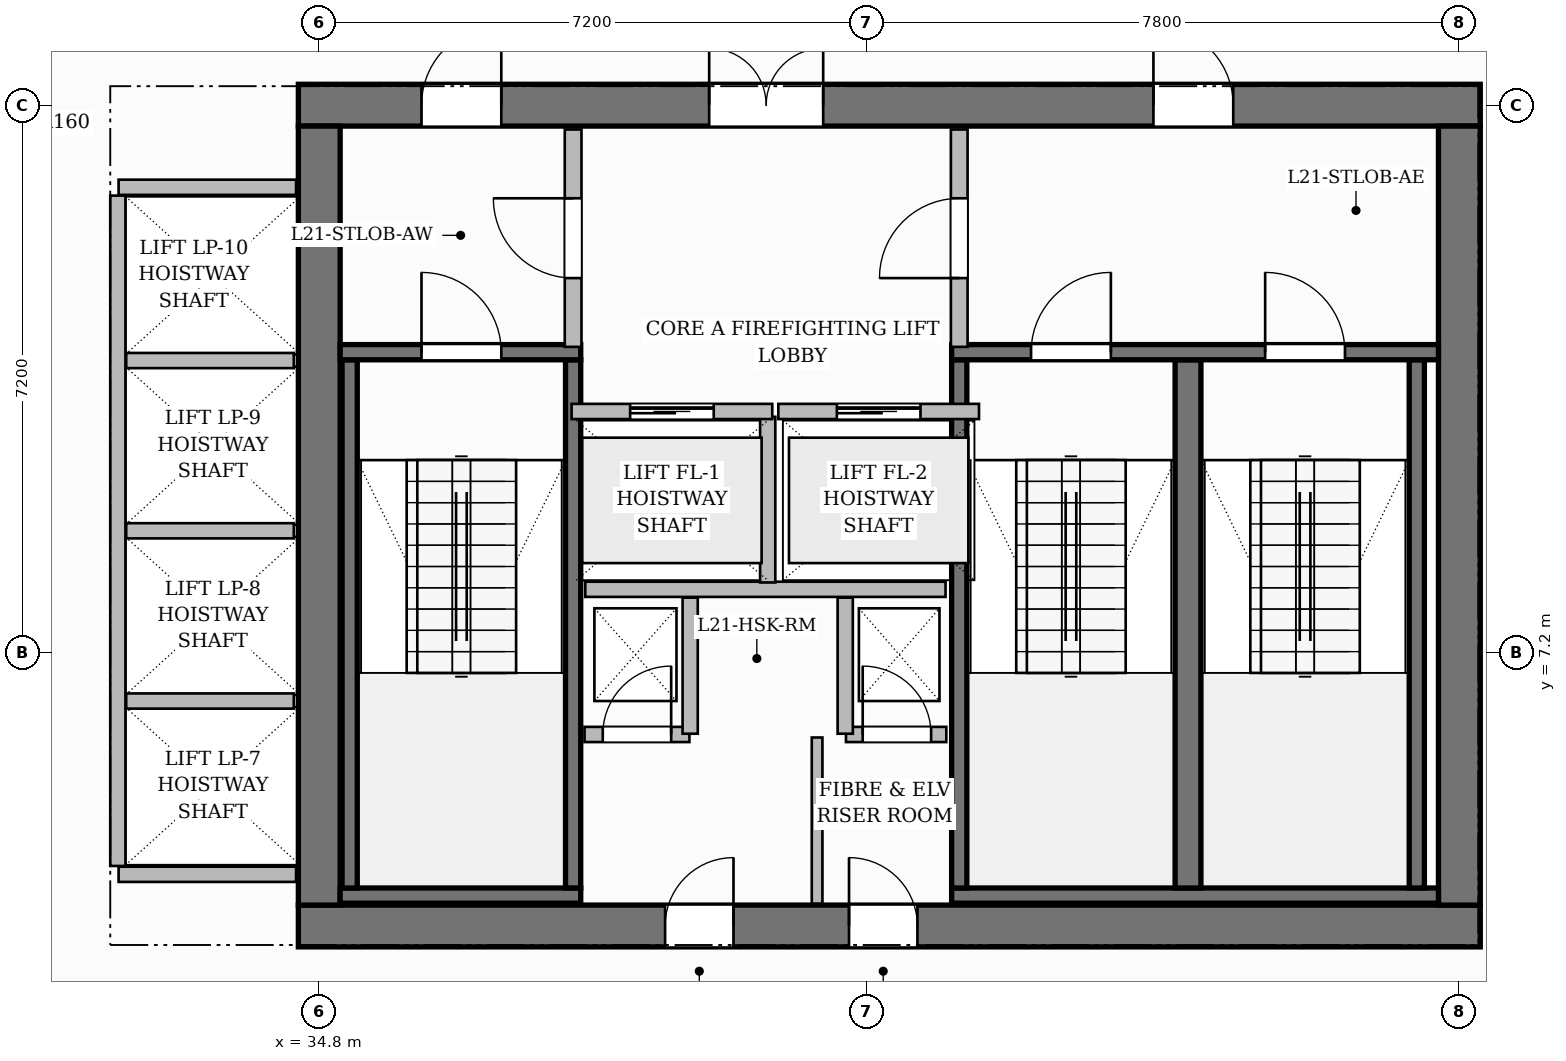
"""IFC4 building model, lengths in metres.
Left out: names, types, materials, properties, quantities, classifications, styles, units other than length and angle.
Written with IfcOpenShell. Run it as: python <this file> out.ifc"""

import sys

from ifc_helpers import new_model, si_unit, direction, frame, frame_2d, origin, place, context, subcontext, project, spatial, rectangle, extrude, source, transform, mapped, element, fill, save


model = new_model("IFC4")
c1 = context("Model", 3, precision=1e-05, world=origin(), true_north=direction((0.0, 1.0)))
c2 = subcontext(c1, "Body", "Model", "MODEL_VIEW")
j1 = project(units=[si_unit("LENGTHUNIT", "METRE"), si_unit("PLANEANGLEUNIT", "RADIAN")], contexts=[c1])
p1 = place(None, origin())
s1 = spatial("IfcSite", under=j1, at=p1, CompositionType="ELEMENT")
p2 = place(p1, origin())
s2 = spatial("IfcBuilding", under=s1, at=p2, CompositionType="ELEMENT")
p3 = place(p2, frame((0.0, 0.0, 87.9)))
s3 = spatial("IfcBuildingStorey", under=s2, at=p3, CompositionType="ELEMENT", Elevation=87.9)
p4 = place(p3, frame((34.525, 3.6, 0.0), z_axis=(0.0, 0.0, 1.0), x_axis=(1.0, 0.0, 0.0)))
e1 = element("IfcWall", 1, at=p4, inside=s3, PredefinedType="SHEAR", context=c2, shape_type="SweptSolid", body=[
    extrude(rectangle(XDim=15.55, YDim=0.55, at=frame_2d((7.775, 0.0))), origin(), (0.0, 0.0, 1.0), 3.7),
])
p5 = place(p4, frame((4.825, 0.0, 0.0)))
e2 = element("IfcOpeningElement", 2, at=p5, cuts=e1, PredefinedType="OPENING", context=c2, shape_type="SweptSolid", body=[
    extrude(rectangle(XDim=0.9, YDim=2.1, at=frame_2d((0.45, 1.05))), frame((0.0, 0.285, 0.0), z_axis=(0.0, -1.0, 0.0), x_axis=(1.0, 0.0, 0.0)), (0.0, 0.0, 1.0), 0.57),
])
p6 = place(p4, frame((7.245, 0.0, 0.0)))
e3 = element("IfcOpeningElement", 3, at=p6, cuts=e1, PredefinedType="OPENING", context=c2, shape_type="SweptSolid", body=[
    extrude(rectangle(XDim=0.9, YDim=2.1, at=frame_2d((0.45, 1.05))), frame((0.0, 0.285, 0.0), z_axis=(0.0, -1.0, 0.0), x_axis=(1.0, 0.0, 0.0)), (0.0, 0.0, 1.0), 0.57),
])
p7 = place(p3, frame((34.525, 14.4, 0.0), z_axis=(0.0, 0.0, 1.0), x_axis=(1.0, 0.0, 0.0)))
e4 = element("IfcWall", 4, at=p7, inside=s3, PredefinedType="SHEAR", context=c2, shape_type="SweptSolid", body=[
    extrude(rectangle(XDim=15.55, YDim=0.55, at=frame_2d((7.775, 0.0))), origin(), (0.0, 0.0, 1.0), 3.7),
])
p8 = place(p7, frame((5.405, 0.0, 0.0)))
e5 = element("IfcOpeningElement", 5, at=p8, cuts=e4, PredefinedType="OPENING", context=c2, shape_type="SweptSolid", body=[
    extrude(rectangle(XDim=1.5, YDim=2.2, at=frame_2d((0.75, 1.1))), frame((0.0, 0.285, 0.0), z_axis=(0.0, -1.0, 0.0), x_axis=(1.0, 0.0, 0.0)), (0.0, 0.0, 1.0), 0.57),
])
p9 = place(p7, frame((1.62, 0.0, 0.0)))
e6 = element("IfcOpeningElement", 6, at=p9, cuts=e4, PredefinedType="OPENING", context=c2, shape_type="SweptSolid", body=[
    extrude(rectangle(XDim=1.05, YDim=2.15, at=frame_2d((0.525, 1.075))), frame((0.0, 0.285, 0.0), z_axis=(0.0, -1.0, 0.0), x_axis=(1.0, 0.0, 0.0)), (0.0, 0.0, 1.0), 0.57),
])
p10 = place(p7, frame((11.25, 0.0, 0.0)))
e7 = element("IfcOpeningElement", 7, at=p10, cuts=e4, PredefinedType="OPENING", context=c2, shape_type="SweptSolid", body=[
    extrude(rectangle(XDim=1.05, YDim=2.15, at=frame_2d((0.525, 1.075))), frame((0.0, 0.285, 0.0), z_axis=(0.0, -1.0, 0.0), x_axis=(1.0, 0.0, 0.0)), (0.0, 0.0, 1.0), 0.57),
])
for number, where, z_axis, x_axis in (
    (8, (34.8, 3.875, 0.0), (0.0, 0.0, 1.0), (0.0, 1.0, 0.0)),
    (9, (49.8, 3.875, 0.0), (0.0, 0.0, 1.0), (0.0, 1.0, 0.0)),
):
    element("IfcWall", number, at=place(p3, frame(where, z_axis=z_axis, x_axis=x_axis)), inside=s3, PredefinedType="SHEAR", context=c2, shape_type="SweptSolid", body=[
        extrude(rectangle(XDim=10.25, YDim=0.55, at=frame_2d((5.125, 0.0))), origin(), (0.0, 0.0, 1.0), 3.7),
    ])
p11 = place(p3, frame((35.075, 4.0, 0.0), z_axis=(0.0, 0.0, 1.0), x_axis=(1.0, 0.0, 0.0)))
e10 = element("IfcWall", 10, at=p11, inside=s3, PredefinedType="SHEAR", context=c2, shape_type="SweptSolid", body=[
    extrude(rectangle(XDim=3.165, YDim=0.2, at=frame_2d((1.583, 0.0))), origin(), (0.0, 0.0, 1.0), 3.7),
])
for number, where, z_axis, x_axis in (
    (11, (35.2, 4.1, 0.0), (0.0, 0.0, 1.0), (0.0, 1.0, 0.0)),
    (12, (38.14, 4.1, 0.0), (0.0, 0.0, 1.0), (0.0, 1.0, 0.0)),
):
    element("IfcWall", number, at=place(p3, frame(where, z_axis=z_axis, x_axis=x_axis)), inside=s3, PredefinedType="SHEAR", context=c2, shape_type="SweptSolid", body=[
        extrude(rectangle(XDim=6.95, YDim=0.2, at=frame_2d((3.475, 0.0))), origin(), (0.0, 0.0, 1.0), 3.7),
    ])
p12 = place(p3, frame((35.075, 11.15, 0.0), z_axis=(0.0, 0.0, 1.0), x_axis=(1.0, 0.0, 0.0)))
e13 = element("IfcWall", 13, at=p12, inside=s3, PredefinedType="SHEAR", context=c2, shape_type="SweptSolid", body=[
    extrude(rectangle(XDim=3.165, YDim=0.2, at=frame_2d((1.583, 0.0))), origin(), (0.0, 0.0, 1.0), 3.7),
])
p13 = place(p12, frame((1.07, 0.0, 0.0)))
e14 = element("IfcOpeningElement", 14, at=p13, cuts=e13, PredefinedType="OPENING", context=c2, shape_type="SweptSolid", body=[
    extrude(rectangle(XDim=1.05, YDim=2.2, at=frame_2d((0.525, 1.1))), frame((0.0, 0.11, 0.0), z_axis=(0.0, -1.0, 0.0), x_axis=(1.0, 0.0, 0.0)), (0.0, 0.0, 1.0), 0.22),
])
p14 = place(p3, frame((43.12, 4.0, 0.0), z_axis=(0.0, 0.0, 1.0), x_axis=(1.0, 0.0, 0.0)))
e15 = element("IfcWall", 15, at=p14, inside=s3, PredefinedType="SHEAR", context=c2, shape_type="SweptSolid", body=[
    extrude(rectangle(XDim=6.405, YDim=0.2, at=frame_2d((3.202, 0.0))), origin(), (0.0, 0.0, 1.0), 3.7),
])
p15 = place(p3, frame((43.22, 4.1, 0.0), z_axis=(0.0, 0.0, 1.0), x_axis=(0.0, 1.0, 0.0)))
e16 = element("IfcWall", 16, at=p15, inside=s3, PredefinedType="SHEAR", context=c2, shape_type="SweptSolid", body=[
    extrude(rectangle(XDim=6.95, YDim=0.2, at=frame_2d((3.475, 0.0))), origin(), (0.0, 0.0, 1.0), 3.7),
])
p16 = place(p3, frame((46.23, 4.1, 0.0), z_axis=(0.0, 0.0, 1.0), x_axis=(0.0, 1.0, 0.0)))
e17 = element("IfcWall", 17, at=p16, inside=s3, PredefinedType="SHEAR", context=c2, shape_type="SweptSolid", body=[
    extrude(rectangle(XDim=6.95, YDim=0.34, at=frame_2d((3.475, 0.0))), origin(), (0.0, 0.0, 1.0), 3.7),
])
p17 = place(p3, frame((49.24, 4.1, 0.0), z_axis=(0.0, 0.0, 1.0), x_axis=(0.0, 1.0, 0.0)))
e18 = element("IfcWall", 18, at=p17, inside=s3, PredefinedType="SHEAR", context=c2, shape_type="SweptSolid", body=[
    extrude(rectangle(XDim=6.95, YDim=0.2, at=frame_2d((3.475, 0.0))), origin(), (0.0, 0.0, 1.0), 3.7),
])
p18 = place(p3, frame((43.12, 11.15, 0.0), z_axis=(0.0, 0.0, 1.0), x_axis=(1.0, 0.0, 0.0)))
e19 = element("IfcWall", 19, at=p18, inside=s3, PredefinedType="SHEAR", context=c2, shape_type="SweptSolid", body=[
    extrude(rectangle(XDim=6.405, YDim=0.2, at=frame_2d((3.202, 0.0))), origin(), (0.0, 0.0, 1.0), 3.7),
])
p19 = place(p18, frame((1.045, 0.0, 0.0)))
e20 = element("IfcOpeningElement", 20, at=p19, cuts=e19, PredefinedType="OPENING", context=c2, shape_type="SweptSolid", body=[
    extrude(rectangle(XDim=1.05, YDim=2.2, at=frame_2d((0.525, 1.1))), frame((0.0, 0.11, 0.0), z_axis=(0.0, -1.0, 0.0), x_axis=(1.0, 0.0, 0.0)), (0.0, 0.0, 1.0), 0.22),
])
p20 = place(p18, frame((4.125, 0.0, 0.0)))
e21 = element("IfcOpeningElement", 21, at=p20, cuts=e19, PredefinedType="OPENING", context=c2, shape_type="SweptSolid", body=[
    extrude(rectangle(XDim=1.05, YDim=2.2, at=frame_2d((0.525, 1.1))), frame((0.0, 0.11, 0.0), z_axis=(0.0, -1.0, 0.0), x_axis=(1.0, 0.0, 0.0)), (0.0, 0.0, 1.0), 0.22),
])
p21 = place(p3, frame((38.3, 8.03, 0.0), z_axis=(0.0, 0.0, 1.0), x_axis=(1.0, 0.0, 0.0)))
e22 = element("IfcWall", 22, at=p21, inside=s3, PredefinedType="PARTITIONING", context=c2, shape_type="SweptSolid", body=[
    extrude(rectangle(XDim=4.74, YDim=0.2, at=frame_2d((2.37, 0.0))), origin(), (0.0, 0.0, 1.0), 3.45),
])
p22 = place(p3, frame((40.7, 8.12, 0.0), z_axis=(0.0, 0.0, 1.0), x_axis=(0.0, 1.0, 0.0)))
e23 = element("IfcWall", 23, at=p22, inside=s3, PredefinedType="PARTITIONING", context=c2, shape_type="SweptSolid", body=[
    extrude(rectangle(XDim=2.18, YDim=0.2, at=frame_2d((1.09, 0.0))), origin(), (0.0, 0.0, 1.0), 3.45),
])
p23 = place(p3, frame((38.14, 11.22, 0.0), z_axis=(0.0, 0.0, 1.0), x_axis=(0.0, 1.0, 0.0)))
e24 = element("IfcWall", 24, at=p23, inside=s3, PredefinedType="PARTITIONING", context=c2, shape_type="SweptSolid", body=[
    extrude(rectangle(XDim=2.86, YDim=0.22, at=frame_2d((1.43, 0.0))), origin(), (0.0, 0.0, 1.0), 3.45),
])
p24 = place(p23, frame((0.905, 0.0, 0.0)))
e25 = element("IfcOpeningElement", 25, at=p24, cuts=e24, PredefinedType="OPENING", context=c2, shape_type="SweptSolid", body=[
    extrude(rectangle(XDim=1.05, YDim=2.15, at=frame_2d((0.525, 1.075))), frame((0.0, 0.12, 0.0), z_axis=(0.0, -1.0, 0.0), x_axis=(1.0, 0.0, 0.0)), (0.0, 0.0, 1.0), 0.24),
])
p25 = place(p3, frame((43.22, 11.22, 0.0), z_axis=(0.0, 0.0, 1.0), x_axis=(0.0, 1.0, 0.0)))
e26 = element("IfcWall", 26, at=p25, inside=s3, PredefinedType="PARTITIONING", context=c2, shape_type="SweptSolid", body=[
    extrude(rectangle(XDim=2.86, YDim=0.22, at=frame_2d((1.43, 0.0))), origin(), (0.0, 0.0, 1.0), 3.45),
])
p26 = place(p25, frame((0.905, 0.0, 0.0)))
e27 = element("IfcOpeningElement", 27, at=p26, cuts=e26, PredefinedType="OPENING", context=c2, shape_type="SweptSolid", body=[
    extrude(rectangle(XDim=1.05, YDim=2.15, at=frame_2d((0.525, 1.075))), frame((0.0, 0.12, 0.0), z_axis=(0.0, -1.0, 0.0), x_axis=(1.0, 0.0, 0.0)), (0.0, 0.0, 1.0), 0.24),
])
p27 = place(p3, frame((38.29, 6.12, 0.0), z_axis=(0.0, 0.0, 1.0), x_axis=(1.0, 0.0, 0.0)))
e28 = element("IfcWall", 28, at=p27, inside=s3, PredefinedType="PARTITIONING", context=c2, shape_type="SweptSolid", body=[
    extrude(rectangle(XDim=1.38, YDim=0.2, at=frame_2d((0.69, 0.0))), origin(), (0.0, 0.0, 1.0), 3.45),
])
p28 = place(p27, frame((0.24, 0.0, 0.0)))
e29 = element("IfcOpeningElement", 29, at=p28, cuts=e28, PredefinedType="OPENING", context=c2, shape_type="SweptSolid", body=[
    extrude(rectangle(XDim=0.9, YDim=2.1, at=frame_2d((0.45, 1.05))), frame((0.0, 0.11, 0.0), z_axis=(0.0, -1.0, 0.0), x_axis=(1.0, 0.0, 0.0)), (0.0, 0.0, 1.0), 0.22),
])
p29 = place(p3, frame((39.68, 6.13, 0.0), z_axis=(0.0, 0.0, 1.0), x_axis=(0.0, 1.0, 0.0)))
e30 = element("IfcWall", 30, at=p29, inside=s3, PredefinedType="PARTITIONING", context=c2, shape_type="SweptSolid", body=[
    extrude(rectangle(XDim=1.79, YDim=0.2, at=frame_2d((0.895, 0.0))), origin(), (0.0, 0.0, 1.0), 3.45),
])
p30 = place(p3, frame((41.73, 6.12, 0.0), z_axis=(0.0, 0.0, 1.0), x_axis=(1.0, 0.0, 0.0)))
e31 = element("IfcWall", 31, at=p30, inside=s3, PredefinedType="PARTITIONING", context=c2, shape_type="SweptSolid", body=[
    extrude(rectangle(XDim=1.32, YDim=0.2, at=frame_2d((0.66, 0.0))), origin(), (0.0, 0.0, 1.0), 3.45),
])
p31 = place(p30, frame((0.22, 0.0, 0.0)))
e32 = element("IfcOpeningElement", 32, at=p31, cuts=e31, PredefinedType="OPENING", context=c2, shape_type="SweptSolid", body=[
    extrude(rectangle(XDim=0.9, YDim=2.1, at=frame_2d((0.45, 1.05))), frame((0.0, 0.11, 0.0), z_axis=(0.0, -1.0, 0.0), x_axis=(1.0, 0.0, 0.0)), (0.0, 0.0, 1.0), 0.22),
])
p32 = place(p3, frame((41.72, 6.13, 0.0), z_axis=(0.0, 0.0, 1.0), x_axis=(0.0, 1.0, 0.0)))
e33 = element("IfcWall", 33, at=p32, inside=s3, PredefinedType="PARTITIONING", context=c2, shape_type="SweptSolid", body=[
    extrude(rectangle(XDim=1.79, YDim=0.2, at=frame_2d((0.895, 0.0))), origin(), (0.0, 0.0, 1.0), 3.45),
])
p33 = place(p3, frame((41.35, 3.895, 0.0), z_axis=(0.0, 0.0, 1.0), x_axis=(0.0, 1.0, 0.0)))
e34 = element("IfcWall", 34, at=p33, inside=s3, PredefinedType="PARTITIONING", context=c2, shape_type="SweptSolid", body=[
    extrude(rectangle(XDim=2.185, YDim=0.14, at=frame_2d((1.093, 0.0))), origin(), (0.0, 0.0, 1.0), 3.45),
])
for number, where, z_axis, x_axis in (
    (35, (32.16, 4.28, 0.0), (0.0, 0.0, 1.0), (1.0, 0.0, 0.0)),
    (36, (32.16, 13.32, 0.0), (0.0, 0.0, 1.0), (1.0, 0.0, 0.0)),
):
    element("IfcWall", number, at=place(p3, frame(where, z_axis=z_axis, x_axis=x_axis)), inside=s3, PredefinedType="PARTITIONING", context=c2, shape_type="SweptSolid", body=[
        extrude(rectangle(XDim=2.335, YDim=0.2, at=frame_2d((1.167, 0.0))), origin(), (0.0, 0.0, 1.0), 3.45),
    ])
p34 = place(p3, frame((32.15, 4.39, 0.0), z_axis=(0.0, 0.0, 1.0), x_axis=(0.0, 1.0, 0.0)))
e37 = element("IfcWall", 37, at=p34, inside=s3, PredefinedType="PARTITIONING", context=c2, shape_type="SweptSolid", body=[
    extrude(rectangle(XDim=8.82, YDim=0.2, at=frame_2d((4.41, 0.0))), origin(), (0.0, 0.0, 1.0), 3.45),
])
for number, where, z_axis, x_axis in (
    (38, (32.26, 6.56, 0.0), (0.0, 0.0, 1.0), (1.0, 0.0, 0.0)),
    (39, (32.26, 8.8, 0.0), (0.0, 0.0, 1.0), (1.0, 0.0, 0.0)),
    (40, (32.26, 11.04, 0.0), (0.0, 0.0, 1.0), (1.0, 0.0, 0.0)),
):
    element("IfcWall", number, at=place(p3, frame(where, z_axis=z_axis, x_axis=x_axis)), inside=s3, PredefinedType="PARTITIONING", context=c2, shape_type="SweptSolid", body=[
        extrude(rectangle(XDim=2.205, YDim=0.2, at=frame_2d((1.103, 0.0))), origin(), (0.0, 0.0, 1.0), 3.45),
    ])
p35 = place(p3, frame((38.12, 10.37, 0.0), z_axis=(0.0, 0.0, 1.0), x_axis=(1.0, 0.0, 0.0)))
e41 = element("IfcWall", 41, at=p35, inside=s3, PredefinedType="PARTITIONING", context=c2, shape_type="SweptSolid", body=[
    extrude(rectangle(XDim=2.64, YDim=0.2, at=frame_2d((1.32, 0.0))), origin(), (0.0, 0.0, 1.0), 3.45),
])
p36 = place(p35, frame((0.77, 0.0, 0.0)))
e42 = element("IfcOpeningElement", 42, at=p36, cuts=e41, PredefinedType="OPENING", context=c2, shape_type="SweptSolid", body=[
    extrude(rectangle(XDim=1.1, YDim=2.2, at=frame_2d((0.55, 1.1))), frame((0.0, 0.11, 0.0), z_axis=(0.0, -1.0, 0.0), x_axis=(1.0, 0.0, 0.0)), (0.0, 0.0, 1.0), 0.22),
])
p37 = place(p3, frame((40.84, 10.37, 0.0), z_axis=(0.0, 0.0, 1.0), x_axis=(1.0, 0.0, 0.0)))
e43 = element("IfcWall", 43, at=p37, inside=s3, PredefinedType="PARTITIONING", context=c2, shape_type="SweptSolid", body=[
    extrude(rectangle(XDim=2.64, YDim=0.2, at=frame_2d((1.32, 0.0))), origin(), (0.0, 0.0, 1.0), 3.45),
])
p38 = place(p37, frame((0.77, 0.0, 0.0)))
e44 = element("IfcOpeningElement", 44, at=p38, cuts=e43, PredefinedType="OPENING", context=c2, shape_type="SweptSolid", body=[
    extrude(rectangle(XDim=1.1, YDim=2.2, at=frame_2d((0.55, 1.1))), frame((0.0, 0.11, 0.0), z_axis=(0.0, -1.0, 0.0), x_axis=(1.0, 0.0, 0.0)), (0.0, 0.0, 1.0), 0.22),
])
m1 = source(origin(), c2, "Body", "SweptSolid", [
    extrude(rectangle(XDim=1.05, YDim=2.2, at=frame_2d((0.525, 1.1))), frame((0.0, 0.025, 0.0), z_axis=(0.0, -1.0, 0.0), x_axis=(1.0, 0.0, 0.0)), (0.0, 0.0, 1.0), 0.05),
])
p39 = place(p13, origin())
e45 = element("IfcDoor", 45, at=p39, inside=s3, OperationType="SINGLE_SWING_LEFT", PredefinedType="DOOR", context=c2, shape_type="MappedRepresentation", body=[
    mapped(m1, transform((0.0, 0.0, 0.0), scale=1.0)),
])
fill(e14, e45)
p40 = place(p19, origin())
e46 = element("IfcDoor", 46, at=p40, inside=s3, OperationType="SINGLE_SWING_RIGHT", PredefinedType="DOOR", context=c2, shape_type="MappedRepresentation", body=[
    mapped(m1, transform((0.0, 0.0, 0.0), scale=1.0)),
])
fill(e20, e46)
p41 = place(p20, origin())
e47 = element("IfcDoor", 47, at=p41, inside=s3, OperationType="SINGLE_SWING_LEFT", PredefinedType="DOOR", context=c2, shape_type="MappedRepresentation", body=[
    mapped(m1, transform((0.0, 0.0, 0.0), scale=1.0)),
])
fill(e21, e47)
m2 = source(origin(), c2, "Body", "SweptSolid", [
    extrude(rectangle(XDim=1.05, YDim=2.15, at=frame_2d((0.525, 1.075))), frame((0.0, 0.025, 0.0), z_axis=(0.0, -1.0, 0.0), x_axis=(1.0, 0.0, 0.0)), (0.0, 0.0, 1.0), 0.05),
])
p42 = place(p24, origin())
e48 = element("IfcDoor", 48, at=p42, inside=s3, OperationType="SINGLE_SWING_RIGHT", PredefinedType="DOOR", context=c2, shape_type="MappedRepresentation", body=[
    mapped(m2, transform((0.0, 0.0, 0.0), scale=1.0)),
])
fill(e25, e48)
p43 = place(p26, origin())
e49 = element("IfcDoor", 49, at=p43, inside=s3, OperationType="SINGLE_SWING_LEFT", PredefinedType="DOOR", context=c2, shape_type="MappedRepresentation", body=[
    mapped(m2, transform((0.0, 0.0, 0.0), scale=1.0)),
])
fill(e27, e49)
m3 = source(origin(), c2, "Body", "SweptSolid", [
    extrude(rectangle(XDim=1.5, YDim=2.2, at=frame_2d((0.75, 1.1))), frame((0.0, 0.025, 0.0), z_axis=(0.0, -1.0, 0.0), x_axis=(1.0, 0.0, 0.0)), (0.0, 0.0, 1.0), 0.05),
])
p44 = place(p8, origin())
e50 = element("IfcDoor", 50, at=p44, inside=s3, OperationType="DOUBLE_DOOR_SINGLE_SWING", PredefinedType="DOOR", context=c2, shape_type="MappedRepresentation", body=[
    mapped(m3, transform((0.0, 0.0, 0.0), scale=1.0)),
])
fill(e5, e50)
p45 = place(p9, origin())
e51 = element("IfcDoor", 51, at=p45, inside=s3, OperationType="SINGLE_SWING_RIGHT", PredefinedType="DOOR", context=c2, shape_type="MappedRepresentation", body=[
    mapped(m2, transform((0.0, 0.0, 0.0), scale=1.0)),
])
fill(e6, e51)
p46 = place(p10, origin())
e52 = element("IfcDoor", 52, at=p46, inside=s3, OperationType="SINGLE_SWING_LEFT", PredefinedType="DOOR", context=c2, shape_type="MappedRepresentation", body=[
    mapped(m2, transform((0.0, 0.0, 0.0), scale=1.0)),
])
fill(e7, e52)
m4 = source(origin(), c2, "Body", "SweptSolid", [
    extrude(rectangle(XDim=0.9, YDim=2.1, at=frame_2d((0.45, 1.05))), frame((0.0, 0.025, 0.0), z_axis=(0.0, -1.0, 0.0), x_axis=(1.0, 0.0, 0.0)), (0.0, 0.0, 1.0), 0.05),
])
p47 = place(p28, origin())
e53 = element("IfcDoor", 53, at=p47, inside=s3, OperationType="SINGLE_SWING_RIGHT", PredefinedType="DOOR", context=c2, shape_type="MappedRepresentation", body=[
    mapped(m4, transform((0.0, 0.0, 0.0), scale=1.0)),
])
fill(e29, e53)
p48 = place(p31, origin())
e54 = element("IfcDoor", 54, at=p48, inside=s3, OperationType="SINGLE_SWING_LEFT", PredefinedType="DOOR", context=c2, shape_type="MappedRepresentation", body=[
    mapped(m4, transform((0.0, 0.0, 0.0), scale=1.0)),
])
fill(e32, e54)
p49 = place(p5, origin())
e55 = element("IfcDoor", 55, at=p49, inside=s3, OperationType="SINGLE_SWING_RIGHT", PredefinedType="DOOR", context=c2, shape_type="MappedRepresentation", body=[
    mapped(m4, transform((0.0, 0.0, 0.0), scale=1.0)),
])
fill(e2, e55)
p50 = place(p6, origin())
e56 = element("IfcDoor", 56, at=p50, inside=s3, OperationType="SINGLE_SWING_LEFT", PredefinedType="DOOR", context=c2, shape_type="MappedRepresentation", body=[
    mapped(m4, transform((0.0, 0.0, 0.0), scale=1.0)),
])
fill(e3, e56)
m5 = source(origin(), c2, "Body", "SweptSolid", [
    extrude(rectangle(XDim=1.1, YDim=2.2, at=frame_2d((0.55, 1.1))), frame((0.0, 0.025, 0.0), z_axis=(0.0, -1.0, 0.0), x_axis=(1.0, 0.0, 0.0)), (0.0, 0.0, 1.0), 0.05),
])
p51 = place(p36, origin())
e57 = element("IfcDoor", 57, at=p51, inside=s3, OperationType="SLIDING_TO_LEFT", PredefinedType="DOOR", context=c2, shape_type="MappedRepresentation", body=[
    mapped(m5, transform((0.0, 0.0, 0.0), scale=1.0)),
])
fill(e42, e57)
p52 = place(p38, origin())
e58 = element("IfcDoor", 58, at=p52, inside=s3, OperationType="SLIDING_TO_LEFT", PredefinedType="DOOR", context=c2, shape_type="MappedRepresentation", body=[
    mapped(m5, transform((0.0, 0.0, 0.0), scale=1.0)),
])
fill(e44, e58)
save(model, sys.argv[1])
